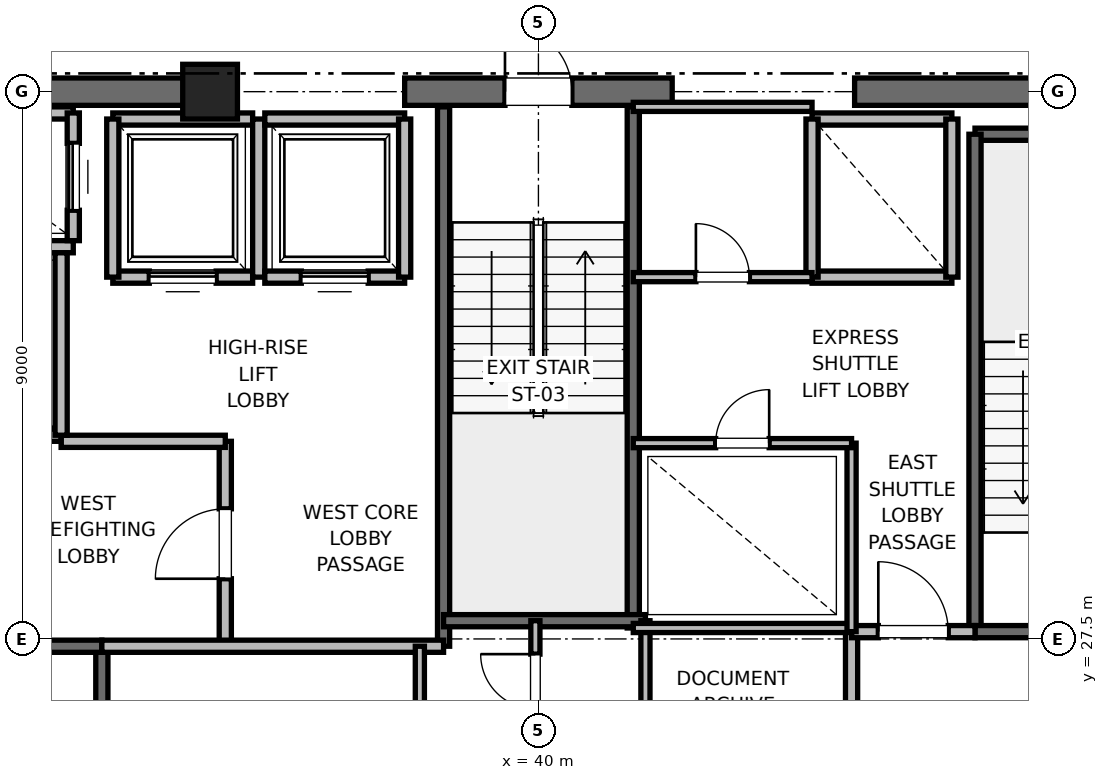
"""IFC4 building model, lengths in metres.
Left out: names, types, materials, properties, quantities, classifications, styles, units other than length and angle.
Written with IfcOpenShell. Run it as: python <this file> out.ifc"""

import sys

from ifc_helpers import new_model, si_unit, direction, frame, frame_2d, origin, origin_2d, place, context, subcontext, project, spatial, rectangle, extrude, element, fill, save


model = new_model("IFC4")
c1 = context("Model", 3, precision=1e-05, world=origin(), true_north=direction((0.0, 1.0)))
c2 = subcontext(c1, "Body", "Model", "MODEL_VIEW")
j1 = project(units=[si_unit("LENGTHUNIT", "METRE"), si_unit("PLANEANGLEUNIT", "RADIAN")], contexts=[c1])
p1 = place(None, origin())
s1 = spatial("IfcSite", under=j1, at=p1, CompositionType="ELEMENT")
p2 = place(p1, origin())
s2 = spatial("IfcBuilding", under=s1, at=p2, CompositionType="ELEMENT")
p3 = place(p2, frame((0.0, 0.0, 263.2)))
s3 = spatial("IfcBuildingStorey", under=s2, at=p3, CompositionType="ELEMENT", Elevation=263.2)
p4 = place(p3, frame((34.6, 36.5, 0.0), z_axis=(0.0, 0.0, 1.0), x_axis=(1.0, 0.0, 0.0)))
e1 = element("IfcColumn", 1, at=p4, inside=s3, PredefinedType="PILASTER", context=c2, shape_type="SweptSolid", body=[
    extrude(rectangle(XDim=0.9, YDim=0.9, at=origin_2d()), origin(), (0.0, 0.0, 1.0), 4.0),
])
p5 = place(p3, frame((29.0, 36.5, 0.0), z_axis=(0.0, 0.0, 1.0), x_axis=(1.0, 0.0, 0.0)))
e2 = element("IfcWall", 2, at=p5, inside=s3, PredefinedType="SHEAR", context=c2, shape_type="SweptSolid", body=[
    extrude(rectangle(XDim=5.8, YDim=0.45, at=frame_2d((2.9, 0.0))), origin(), (0.0, 0.0, 1.0), 3.785),
])
p6 = place(p3, frame((37.8, 36.5, 0.0), z_axis=(0.0, 0.0, 1.0), x_axis=(1.0, 0.0, 0.0)))
e3 = element("IfcWall", 3, at=p6, inside=s3, PredefinedType="SHEAR", context=c2, shape_type="SweptSolid", body=[
    extrude(rectangle(XDim=4.4, YDim=0.45, at=frame_2d((2.2, 0.0))), origin(), (0.0, 0.0, 1.0), 3.785),
])
p7 = place(p6, frame((1.65, 0.0, 0.0)))
e4 = element("IfcOpeningElement", 4, at=p7, cuts=e3, PredefinedType="OPENING", context=c2, shape_type="SweptSolid", body=[
    extrude(rectangle(XDim=1.1, YDim=2.15, at=frame_2d((0.55, 1.075))), frame((0.0, 0.225, 0.0), z_axis=(0.0, -1.0, 0.0), x_axis=(1.0, 0.0, 0.0)), (0.0, 0.0, 1.0), 0.45),
])
p8 = place(p3, frame((45.2, 36.5, 0.0), z_axis=(0.0, 0.0, 1.0), x_axis=(1.0, 0.0, 0.0)))
e5 = element("IfcWall", 5, at=p8, inside=s3, PredefinedType="SHEAR", context=c2, shape_type="SweptSolid", body=[
    extrude(rectangle(XDim=5.8, YDim=0.45, at=frame_2d((2.9, 0.0))), origin(), (0.0, 0.0, 1.0), 3.785),
])
p9 = place(p3, frame((32.82, 18.6, 0.0), z_axis=(0.0, 0.0, 1.0), x_axis=(0.0, 1.0, 0.0)))
e6 = element("IfcWall", 6, at=p9, inside=s3, PredefinedType="SOLIDWALL", context=c2, shape_type="SweptSolid", body=[
    extrude(rectangle(XDim=8.78, YDim=0.2, at=frame_2d((4.39, 0.0))), origin(), (0.0, 0.0, 1.0), 3.785),
])
p10 = place(p3, frame((29.7, 27.38, 0.0), z_axis=(0.0, 0.0, 1.0), x_axis=(1.0, 0.0, 0.0)))
e7 = element("IfcWall", 7, at=p10, inside=s3, PredefinedType="SOLIDWALL", context=c2, shape_type="SweptSolid", body=[
    extrude(rectangle(XDim=3.12, YDim=0.2, at=frame_2d((1.56, 0.0))), origin(), (0.0, 0.0, 1.0), 3.785),
])
p11 = place(p10, frame((1.01, 0.0, 0.0)))
e8 = element("IfcOpeningElement", 8, at=p11, cuts=e7, PredefinedType="OPENING", context=c2, shape_type="SweptSolid", body=[
    extrude(rectangle(XDim=1.1, YDim=2.15, at=frame_2d((0.55, 1.075))), frame((0.0, 0.1, 0.0), z_axis=(0.0, -1.0, 0.0), x_axis=(1.0, 0.0, 0.0)), (0.0, 0.0, 1.0), 0.2),
])
p12 = place(p3, frame((47.18, 35.8, 0.0), z_axis=(0.0, 0.0, 1.0), x_axis=(1.0, 0.0, 0.0)))
e9 = element("IfcWall", 9, at=p12, inside=s3, PredefinedType="SOLIDWALL", context=c2, shape_type="SweptSolid", body=[
    extrude(rectangle(XDim=3.12, YDim=0.2, at=frame_2d((1.56, 0.0))), origin(), (0.0, 0.0, 1.0), 3.785),
])
p13 = place(p3, frame((47.18, 27.62, 0.0), z_axis=(0.0, 0.0, 1.0), x_axis=(0.0, 1.0, 0.0)))
e10 = element("IfcWall", 10, at=p13, inside=s3, PredefinedType="SOLIDWALL", context=c2, shape_type="SweptSolid", body=[
    extrude(rectangle(XDim=8.18, YDim=0.2, at=frame_2d((4.09, 0.0))), origin(), (0.0, 0.0, 1.0), 3.785),
])
p14 = place(p3, frame((47.18, 27.62, 0.0), z_axis=(0.0, 0.0, 1.0), x_axis=(1.0, 0.0, 0.0)))
e11 = element("IfcWall", 11, at=p14, inside=s3, PredefinedType="SOLIDWALL", context=c2, shape_type="SweptSolid", body=[
    extrude(rectangle(XDim=3.12, YDim=0.2, at=frame_2d((1.56, 0.0))), origin(), (0.0, 0.0, 1.0), 3.785),
])
p15 = place(p14, frame((1.01, 0.0, 0.0)))
e12 = element("IfcOpeningElement", 12, at=p15, cuts=e11, PredefinedType="OPENING", context=c2, shape_type="SweptSolid", body=[
    extrude(rectangle(XDim=1.1, YDim=2.15, at=frame_2d((0.55, 1.075))), frame((0.0, 0.1, 0.0), z_axis=(0.0, -1.0, 0.0), x_axis=(1.0, 0.0, 0.0)), (0.0, 0.0, 1.0), 0.2),
])
p16 = place(p3, frame((38.44, 27.38, 0.0), z_axis=(0.0, 0.0, 1.0), x_axis=(0.0, 1.0, 0.0)))
e13 = element("IfcWall", 13, at=p16, inside=s3, PredefinedType="SOLIDWALL", context=c2, shape_type="SweptSolid", body=[
    extrude(rectangle(XDim=8.87, YDim=0.2, at=frame_2d((4.435, 0.0))), origin(), (0.0, 0.0, 1.0), 3.785),
])
p17 = place(p3, frame((41.56, 27.68, 0.0), z_axis=(0.0, 0.0, 1.0), x_axis=(0.0, 1.0, 0.0)))
e14 = element("IfcWall", 14, at=p17, inside=s3, PredefinedType="SOLIDWALL", context=c2, shape_type="SweptSolid", body=[
    extrude(rectangle(XDim=8.57, YDim=0.2, at=frame_2d((4.285, 0.0))), origin(), (0.0, 0.0, 1.0), 3.785),
])
p18 = place(p3, frame((38.44, 27.8, 0.0), z_axis=(0.0, 0.0, 1.0), x_axis=(1.0, 0.0, 0.0)))
e15 = element("IfcWall", 15, at=p18, inside=s3, PredefinedType="SOLIDWALL", context=c2, shape_type="SweptSolid", body=[
    extrude(rectangle(XDim=3.32, YDim=0.2, at=frame_2d((1.66, 0.0))), origin(), (0.0, 0.0, 1.0), 3.785),
])
p19 = place(p3, frame((34.85, 27.38, 0.0), z_axis=(0.0, 0.0, 1.0), x_axis=(0.0, 1.0, 0.0)))
e16 = element("IfcWall", 16, at=p19, inside=s3, PredefinedType="PARTITIONING", context=c2, shape_type="SweptSolid", body=[
    extrude(rectangle(XDim=3.37, YDim=0.2, at=frame_2d((1.685, 0.0))), origin(), (0.0, 0.0, 1.0), 3.785),
])
p20 = place(p19, frame((1.11, 0.0, 0.0)))
e17 = element("IfcOpeningElement", 17, at=p20, cuts=e16, PredefinedType="OPENING", context=c2, shape_type="SweptSolid", body=[
    extrude(rectangle(XDim=1.15, YDim=2.2, at=frame_2d((0.575, 1.1))), frame((0.0, 0.1, 0.0), z_axis=(0.0, -1.0, 0.0), x_axis=(1.0, 0.0, 0.0)), (0.0, 0.0, 1.0), 0.2),
])
p21 = place(p3, frame((32.82, 27.38, 0.0), z_axis=(0.0, 0.0, 1.0), x_axis=(1.0, 0.0, 0.0)))
e18 = element("IfcWall", 18, at=p21, inside=s3, PredefinedType="PARTITIONING", context=c2, shape_type="SweptSolid", body=[
    extrude(rectangle(XDim=5.62, YDim=0.2, at=frame_2d((2.81, 0.0))), origin(), (0.0, 0.0, 1.0), 3.785),
])
p22 = place(p3, frame((32.15, 30.75, 0.0), z_axis=(0.0, 0.0, 1.0), x_axis=(1.0, 0.0, 0.0)))
e19 = element("IfcWall", 19, at=p22, inside=s3, PredefinedType="PARTITIONING", context=c2, shape_type="SweptSolid", body=[
    extrude(rectangle(XDim=2.7, YDim=0.2, at=frame_2d((1.35, 0.0))), origin(), (0.0, 0.0, 1.0), 3.785),
])
p23 = place(p3, frame((45.15, 24.25, 0.0), z_axis=(0.0, 0.0, 1.0), x_axis=(0.0, 1.0, 0.0)))
e20 = element("IfcWall", 20, at=p23, inside=s3, PredefinedType="PARTITIONING", context=c2, shape_type="SweptSolid", body=[
    extrude(rectangle(XDim=3.37, YDim=0.2, at=frame_2d((1.685, 0.0))), origin(), (0.0, 0.0, 1.0), 3.785),
])
p24 = place(p3, frame((45.15, 27.62, 0.0), z_axis=(0.0, 0.0, 1.0), x_axis=(1.0, 0.0, 0.0)))
e21 = element("IfcWall", 21, at=p24, inside=s3, PredefinedType="PARTITIONING", context=c2, shape_type="SweptSolid", body=[
    extrude(rectangle(XDim=2.03, YDim=0.2, at=frame_2d((1.015, 0.0))), origin(), (0.0, 0.0, 1.0), 3.785),
])
p25 = place(p24, frame((0.44, 0.0, 0.0)))
e22 = element("IfcOpeningElement", 22, at=p25, cuts=e21, PredefinedType="OPENING", context=c2, shape_type="SweptSolid", body=[
    extrude(rectangle(XDim=1.15, YDim=2.2, at=frame_2d((0.575, 1.1))), frame((0.0, 0.1, 0.0), z_axis=(0.0, -1.0, 0.0), x_axis=(1.0, 0.0, 0.0)), (0.0, 0.0, 1.0), 0.2),
])
p26 = place(p3, frame((29.55, 30.85, 0.0), z_axis=(0.0, 0.0, 1.0), x_axis=(1.0, 0.0, 0.0)))
e23 = element("IfcWall", 23, at=p26, inside=s3, PredefinedType="SOLIDWALL", context=c2, shape_type="SweptSolid", body=[
    extrude(rectangle(XDim=2.6, YDim=0.2, at=frame_2d((1.3, 0.0))), origin(), (0.0, 0.0, 1.0), 2.865),
])
p27 = place(p26, frame((0.75, 0.0, 0.0)))
e24 = element("IfcOpeningElement", 24, at=p27, cuts=e23, PredefinedType="OPENING", context=c2, shape_type="SweptSolid", body=[
    extrude(rectangle(XDim=1.1, YDim=2.2, at=frame_2d((0.55, 1.1))), frame((0.0, 0.1, 0.0), z_axis=(0.0, -1.0, 0.0), x_axis=(1.0, 0.0, 0.0)), (0.0, 0.0, 1.0), 0.2),
])
p28 = place(p3, frame((29.55, 33.95, 0.0), z_axis=(0.0, 0.0, 1.0), x_axis=(1.0, 0.0, 0.0)))
e25 = element("IfcWall", 25, at=p28, inside=s3, PredefinedType="SOLIDWALL", context=c2, shape_type="SweptSolid", body=[
    extrude(rectangle(XDim=2.8, YDim=0.2, at=frame_2d((1.4, 0.0))), origin(), (0.0, 0.0, 1.0), 3.785),
])
p29 = place(p3, frame((32.15, 30.85, 0.0), z_axis=(0.0, 0.0, 1.0), x_axis=(0.0, 1.0, 0.0)))
e26 = element("IfcWall", 26, at=p29, inside=s3, PredefinedType="SOLIDWALL", context=c2, shape_type="SweptSolid", body=[
    extrude(rectangle(XDim=3.0, YDim=0.2, at=frame_2d((1.5, 0.0))), origin(), (0.0, 0.0, 1.0), 3.785),
])
p30 = place(p3, frame((32.35, 36.15, 0.0), z_axis=(0.0, 0.0, 1.0), x_axis=(-1.0, 0.0, 0.0)))
e27 = element("IfcWall", 27, at=p30, inside=s3, PredefinedType="SOLIDWALL", context=c2, shape_type="SweptSolid", body=[
    extrude(rectangle(XDim=2.8, YDim=0.2, at=frame_2d((1.4, 0.0))), origin(), (0.0, 0.0, 1.0), 3.148),
])
p31 = place(p3, frame((32.35, 34.05, 0.0), z_axis=(0.0, 0.0, 1.0), x_axis=(0.0, 1.0, 0.0)))
e28 = element("IfcWall", 28, at=p31, inside=s3, PredefinedType="SOLIDWALL", context=c2, shape_type="SweptSolid", body=[
    extrude(rectangle(XDim=2.1, YDim=0.2, at=frame_2d((1.05, 0.0))), origin(), (0.0, 0.0, 1.0), 3.785),
])
p32 = place(p31, frame((0.5, 0.0, 0.0)))
e29 = element("IfcOpeningElement", 29, at=p32, cuts=e28, PredefinedType="OPENING", context=c2, shape_type="SweptSolid", body=[
    extrude(rectangle(XDim=1.1, YDim=2.2, at=frame_2d((0.55, 1.1))), frame((0.0, 0.1, 0.0), z_axis=(0.0, -1.0, 0.0), x_axis=(1.0, 0.0, 0.0)), (0.0, 0.0, 1.0), 0.2),
])
p33 = place(p3, frame((33.0, 33.45, 0.0), z_axis=(0.0, 0.0, 1.0), x_axis=(1.0, 0.0, 0.0)))
e30 = element("IfcWall", 30, at=p33, inside=s3, PredefinedType="SOLIDWALL", context=c2, shape_type="SweptSolid", body=[
    extrude(rectangle(XDim=2.3, YDim=0.2, at=frame_2d((1.15, 0.0))), origin(), (0.0, 0.0, 1.0), 3.785),
])
p34 = place(p33, frame((0.6, 0.0, 0.0)))
e31 = element("IfcOpeningElement", 31, at=p34, cuts=e30, PredefinedType="OPENING", context=c2, shape_type="SweptSolid", body=[
    extrude(rectangle(XDim=1.1, YDim=2.2, at=frame_2d((0.55, 1.1))), frame((0.0, 0.1, 0.0), z_axis=(0.0, -1.0, 0.0), x_axis=(1.0, 0.0, 0.0)), (0.0, 0.0, 1.0), 0.2),
])
p35 = place(p3, frame((35.3, 36.05, 0.0), z_axis=(0.0, 0.0, 1.0), x_axis=(-1.0, 0.0, 0.0)))
e32 = element("IfcWall", 32, at=p35, inside=s3, PredefinedType="SOLIDWALL", context=c2, shape_type="SweptSolid", body=[
    extrude(rectangle(XDim=2.3, YDim=0.2, at=frame_2d((1.15, 0.0))), origin(), (0.0, 0.0, 1.0), 2.865),
])
p36 = place(p3, frame((33.0, 36.05, 0.0), z_axis=(0.0, 0.0, 1.0), x_axis=(0.0, -1.0, 0.0)))
e33 = element("IfcWall", 33, at=p36, inside=s3, PredefinedType="SOLIDWALL", context=c2, shape_type="SweptSolid", body=[
    extrude(rectangle(XDim=2.6, YDim=0.2, at=frame_2d((1.3, 0.0))), origin(), (0.0, 0.0, 1.0), 3.785),
])
p37 = place(p3, frame((35.4, 33.45, 0.0), z_axis=(0.0, 0.0, 1.0), x_axis=(0.0, 1.0, 0.0)))
e34 = element("IfcWall", 34, at=p37, inside=s3, PredefinedType="SOLIDWALL", context=c2, shape_type="SweptSolid", body=[
    extrude(rectangle(XDim=2.6, YDim=0.2, at=frame_2d((1.3, 0.0))), origin(), (0.0, 0.0, 1.0), 2.865),
])
p38 = place(p3, frame((35.5, 33.45, 0.0), z_axis=(0.0, 0.0, 1.0), x_axis=(1.0, 0.0, 0.0)))
e35 = element("IfcWall", 35, at=p38, inside=s3, PredefinedType="SOLIDWALL", context=c2, shape_type="SweptSolid", body=[
    extrude(rectangle(XDim=2.3, YDim=0.2, at=frame_2d((1.15, 0.0))), origin(), (0.0, 0.0, 1.0), 3.785),
])
p39 = place(p38, frame((0.6, 0.0, 0.0)))
e36 = element("IfcOpeningElement", 36, at=p39, cuts=e35, PredefinedType="OPENING", context=c2, shape_type="SweptSolid", body=[
    extrude(rectangle(XDim=1.1, YDim=2.2, at=frame_2d((0.55, 1.1))), frame((0.0, 0.1, 0.0), z_axis=(0.0, -1.0, 0.0), x_axis=(1.0, 0.0, 0.0)), (0.0, 0.0, 1.0), 0.2),
])
p40 = place(p3, frame((37.8, 36.05, 0.0), z_axis=(0.0, 0.0, 1.0), x_axis=(-1.0, 0.0, 0.0)))
e37 = element("IfcWall", 37, at=p40, inside=s3, PredefinedType="SOLIDWALL", context=c2, shape_type="SweptSolid", body=[
    extrude(rectangle(XDim=2.3, YDim=0.2, at=frame_2d((1.15, 0.0))), origin(), (0.0, 0.0, 1.0), 2.865),
])
p41 = place(p3, frame((37.8, 33.45, 0.0), z_axis=(0.0, 0.0, 1.0), x_axis=(0.0, 1.0, 0.0)))
e38 = element("IfcWall", 38, at=p41, inside=s3, PredefinedType="SOLIDWALL", context=c2, shape_type="SweptSolid", body=[
    extrude(rectangle(XDim=2.6, YDim=0.2, at=frame_2d((1.3, 0.0))), origin(), (0.0, 0.0, 1.0), 2.865),
])
p42 = place(p3, frame((44.5, 33.45, 0.0), z_axis=(0.0, 0.0, 1.0), x_axis=(1.0, 0.0, 0.0)))
e39 = element("IfcWall", 39, at=p42, inside=s3, PredefinedType="SOLIDWALL", context=c2, shape_type="SweptSolid", body=[
    extrude(rectangle(XDim=2.3, YDim=0.2, at=frame_2d((1.15, 0.0))), origin(), (0.0, 0.0, 1.0), 3.785),
])
p43 = place(p3, frame((46.8, 36.05, 0.0), z_axis=(0.0, 0.0, 1.0), x_axis=(-1.0, 0.0, 0.0)))
e40 = element("IfcWall", 40, at=p43, inside=s3, PredefinedType="SOLIDWALL", context=c2, shape_type="SweptSolid", body=[
    extrude(rectangle(XDim=2.3, YDim=0.2, at=frame_2d((1.15, 0.0))), origin(), (0.0, 0.0, 1.0), 2.865),
])
p44 = place(p3, frame((44.5, 36.05, 0.0), z_axis=(0.0, 0.0, 1.0), x_axis=(0.0, -1.0, 0.0)))
e41 = element("IfcWall", 41, at=p44, inside=s3, PredefinedType="SOLIDWALL", context=c2, shape_type="SweptSolid", body=[
    extrude(rectangle(XDim=2.6, YDim=0.2, at=frame_2d((1.3, 0.0))), origin(), (0.0, 0.0, 1.0), 2.865),
])
p45 = place(p3, frame((46.8, 33.45, 0.0), z_axis=(0.0, 0.0, 1.0), x_axis=(0.0, 1.0, 0.0)))
e42 = element("IfcWall", 42, at=p45, inside=s3, PredefinedType="SOLIDWALL", context=c2, shape_type="SweptSolid", body=[
    extrude(rectangle(XDim=2.6, YDim=0.2, at=frame_2d((1.3, 0.0))), origin(), (0.0, 0.0, 1.0), 3.785),
])
p46 = place(p3, frame((41.76, 23.8, 0.0), z_axis=(0.0, 0.0, 1.0), x_axis=(0.0, 1.0, 0.0)))
e43 = element("IfcWall", 43, at=p46, inside=s3, PredefinedType="PARTITIONING", context=c2, shape_type="SweptSolid", body=[
    extrude(rectangle(XDim=4.0, YDim=0.15, at=frame_2d((2.0, 0.0))), origin(), (0.0, 0.0, 1.0), 2.85),
])
p47 = place(p3, frame((39.95, 25.8, 0.0), z_axis=(0.0, 0.0, 1.0), x_axis=(0.0, 1.0, 0.0)))
e44 = element("IfcWall", 44, at=p47, inside=s3, PredefinedType="PARTITIONING", context=c2, shape_type="SweptSolid", body=[
    extrude(rectangle(XDim=2.0, YDim=0.15, at=frame_2d((1.0, 0.0))), origin(), (0.0, 0.0, 1.0), 2.85),
])
p48 = place(p47, frame((0.55, 0.0, 0.0)))
e45 = element("IfcOpeningElement", 45, at=p48, cuts=e44, PredefinedType="OPENING", context=c2, shape_type="SweptSolid", body=[
    extrude(rectangle(XDim=0.9, YDim=2.1, at=frame_2d((0.45, 1.05))), frame((0.0, 0.075, 0.0), z_axis=(0.0, -1.0, 0.0), x_axis=(1.0, 0.0, 0.0)), (0.0, 0.0, 1.0), 0.15),
])
p49 = place(p3, frame((38.05, 18.6, 0.0), z_axis=(0.0, 0.0, 1.0), x_axis=(0.0, 1.0, 0.0)))
e46 = element("IfcWall", 46, at=p49, inside=s3, PredefinedType="PARTITIONING", context=c2, shape_type="SweptSolid", body=[
    extrude(rectangle(XDim=8.78, YDim=0.15, at=frame_2d((4.39, 0.0))), origin(), (0.0, 0.0, 1.0), 2.85),
])
p50 = place(p49, frame((3.89, 0.0, 0.0)))
e47 = element("IfcOpeningElement", 47, at=p50, cuts=e46, PredefinedType="OPENING", context=c2, shape_type="SweptSolid", body=[
    extrude(rectangle(XDim=1.0, YDim=2.15, at=frame_2d((0.5, 1.075))), frame((0.0, 0.075, 0.0), z_axis=(0.0, -1.0, 0.0), x_axis=(1.0, 0.0, 0.0)), (0.0, 0.0, 1.0), 0.15),
])
p51 = place(p3, frame((41.56, 27.68, 0.0), z_axis=(0.0, 0.0, 1.0), x_axis=(1.0, 0.0, 0.0)))
e48 = element("IfcWall", 48, at=p51, inside=s3, PredefinedType="PARTITIONING", context=c2, shape_type="SweptSolid", body=[
    extrude(rectangle(XDim=3.59, YDim=0.15, at=frame_2d((1.795, 0.0))), origin(), (0.0, 0.0, 1.0), 2.85),
])
p52 = place(p3, frame((45.15, 27.62, 0.0), z_axis=(0.0, 0.0, 1.0), x_axis=(0.0, 1.0, 0.0)))
e49 = element("IfcWall", 49, at=p52, inside=s3, PredefinedType="PARTITIONING", context=c2, shape_type="SweptSolid", body=[
    extrude(rectangle(XDim=3.1, YDim=0.15, at=frame_2d((1.55, 0.0))), origin(), (0.0, 0.0, 1.0), 2.85),
])
p53 = place(p3, frame((41.56, 30.72, 0.0), z_axis=(0.0, 0.0, 1.0), x_axis=(1.0, 0.0, 0.0)))
e50 = element("IfcWall", 50, at=p53, inside=s3, PredefinedType="PARTITIONING", context=c2, shape_type="SweptSolid", body=[
    extrude(rectangle(XDim=3.59, YDim=0.15, at=frame_2d((1.795, 0.0))), origin(), (0.0, 0.0, 1.0), 2.85),
])
p54 = place(p53, frame((1.355, 0.0, 0.0)))
e51 = element("IfcOpeningElement", 51, at=p54, cuts=e50, PredefinedType="OPENING", context=c2, shape_type="SweptSolid", body=[
    extrude(rectangle(XDim=0.88, YDim=2.1, at=frame_2d((0.44, 1.05))), frame((0.0, 0.075, 0.0), z_axis=(0.0, -1.0, 0.0), x_axis=(1.0, 0.0, 0.0)), (0.0, 0.0, 1.0), 0.15),
])
p55 = place(p3, frame((41.56, 36.25, 0.0), z_axis=(0.0, 0.0, 1.0), x_axis=(1.0, 0.0, 0.0)))
e52 = element("IfcWall", 52, at=p55, inside=s3, PredefinedType="PARTITIONING", context=c2, shape_type="SweptSolid", body=[
    extrude(rectangle(XDim=2.94, YDim=0.15, at=frame_2d((1.47, 0.0))), origin(), (0.0, 0.0, 1.0), 2.85),
])
p56 = place(p3, frame((41.56, 33.45, 0.0), z_axis=(0.0, 0.0, 1.0), x_axis=(1.0, 0.0, 0.0)))
e53 = element("IfcWall", 53, at=p56, inside=s3, PredefinedType="PARTITIONING", context=c2, shape_type="SweptSolid", body=[
    extrude(rectangle(XDim=2.94, YDim=0.15, at=frame_2d((1.47, 0.0))), origin(), (0.0, 0.0, 1.0), 2.85),
])
p57 = place(p56, frame((1.03, 0.0, 0.0)))
e54 = element("IfcOpeningElement", 54, at=p57, cuts=e53, PredefinedType="OPENING", context=c2, shape_type="SweptSolid", body=[
    extrude(rectangle(XDim=0.88, YDim=2.1, at=frame_2d((0.44, 1.05))), frame((0.0, 0.075, 0.0), z_axis=(0.0, -1.0, 0.0), x_axis=(1.0, 0.0, 0.0)), (0.0, 0.0, 1.0), 0.15),
])
p58 = place(p7, origin())
e55 = element("IfcDoor", 55, at=p58, inside=s3, OperationType="SINGLE_SWING_LEFT", PredefinedType="DOOR", context=c2, shape_type="SweptSolid", body=[
    extrude(rectangle(XDim=1.1, YDim=2.15, at=frame_2d((0.55, 1.075))), frame((0.0, 0.025, 0.0), z_axis=(0.0, -1.0, 0.0), x_axis=(1.0, 0.0, 0.0)), (0.0, 0.0, 1.0), 0.05),
])
fill(e4, e55)
p59 = place(p20, origin())
e56 = element("IfcDoor", 56, at=p59, inside=s3, OperationType="SINGLE_SWING_LEFT", PredefinedType="DOOR", context=c2, shape_type="SweptSolid", body=[
    extrude(rectangle(XDim=1.15, YDim=2.2, at=frame_2d((0.575, 1.1))), frame((0.0, 0.025, 0.0), z_axis=(0.0, -1.0, 0.0), x_axis=(1.0, 0.0, 0.0)), (0.0, 0.0, 1.0), 0.05),
])
fill(e17, e56)
p60 = place(p25, origin())
e57 = element("IfcDoor", 57, at=p60, inside=s3, OperationType="SINGLE_SWING_LEFT", PredefinedType="DOOR", context=c2, shape_type="SweptSolid", body=[
    extrude(rectangle(XDim=1.15, YDim=2.2, at=frame_2d((0.575, 1.1))), frame((0.0, 0.025, 0.0), z_axis=(0.0, -1.0, 0.0), x_axis=(1.0, 0.0, 0.0)), (0.0, 0.0, 1.0), 0.05),
])
fill(e22, e57)
p61 = place(p32, origin())
e58 = element("IfcDoor", 58, at=p61, inside=s3, OperationType="SLIDING_TO_RIGHT", PredefinedType="DOOR", context=c2, shape_type="SweptSolid", body=[
    extrude(rectangle(XDim=1.1, YDim=2.2, at=frame_2d((0.55, 1.1))), frame((0.0, 0.025, 0.0), z_axis=(0.0, -1.0, 0.0), x_axis=(1.0, 0.0, 0.0)), (0.0, 0.0, 1.0), 0.05),
])
fill(e29, e58)
p62 = place(p34, origin())
e59 = element("IfcDoor", 59, at=p62, inside=s3, OperationType="SLIDING_TO_RIGHT", PredefinedType="DOOR", context=c2, shape_type="SweptSolid", body=[
    extrude(rectangle(XDim=1.1, YDim=2.2, at=frame_2d((0.55, 1.1))), frame((0.0, 0.025, 0.0), z_axis=(0.0, -1.0, 0.0), x_axis=(1.0, 0.0, 0.0)), (0.0, 0.0, 1.0), 0.05),
])
fill(e31, e59)
p63 = place(p39, origin())
e60 = element("IfcDoor", 60, at=p63, inside=s3, OperationType="SLIDING_TO_RIGHT", PredefinedType="DOOR", context=c2, shape_type="SweptSolid", body=[
    extrude(rectangle(XDim=1.1, YDim=2.2, at=frame_2d((0.55, 1.1))), frame((0.0, 0.025, 0.0), z_axis=(0.0, -1.0, 0.0), x_axis=(1.0, 0.0, 0.0)), (0.0, 0.0, 1.0), 0.05),
])
fill(e36, e60)
p64 = place(p48, origin())
e61 = element("IfcDoor", 61, at=p64, inside=s3, OperationType="SINGLE_SWING_RIGHT", PredefinedType="DOOR", context=c2, shape_type="SweptSolid", body=[
    extrude(rectangle(XDim=0.9, YDim=2.1, at=frame_2d((0.45, 1.05))), frame((0.0, 0.025, 0.0), z_axis=(0.0, -1.0, 0.0), x_axis=(1.0, 0.0, 0.0)), (0.0, 0.0, 1.0), 0.05),
])
fill(e45, e61)
p65 = place(p54, origin())
e62 = element("IfcDoor", 62, at=p65, inside=s3, OperationType="SINGLE_SWING_RIGHT", PredefinedType="DOOR", context=c2, shape_type="SweptSolid", body=[
    extrude(rectangle(XDim=0.88, YDim=2.1, at=frame_2d((0.44, 1.05))), frame((0.0, 0.025, 0.0), z_axis=(0.0, -1.0, 0.0), x_axis=(1.0, 0.0, 0.0)), (0.0, 0.0, 1.0), 0.05),
])
fill(e51, e62)
p66 = place(p57, origin())
e63 = element("IfcDoor", 63, at=p66, inside=s3, OperationType="SINGLE_SWING_LEFT", PredefinedType="DOOR", context=c2, shape_type="SweptSolid", body=[
    extrude(rectangle(XDim=0.88, YDim=2.1, at=frame_2d((0.44, 1.05))), frame((0.0, 0.025, 0.0), z_axis=(0.0, -1.0, 0.0), x_axis=(1.0, 0.0, 0.0)), (0.0, 0.0, 1.0), 0.05),
])
fill(e54, e63)
save(model, sys.argv[1])
